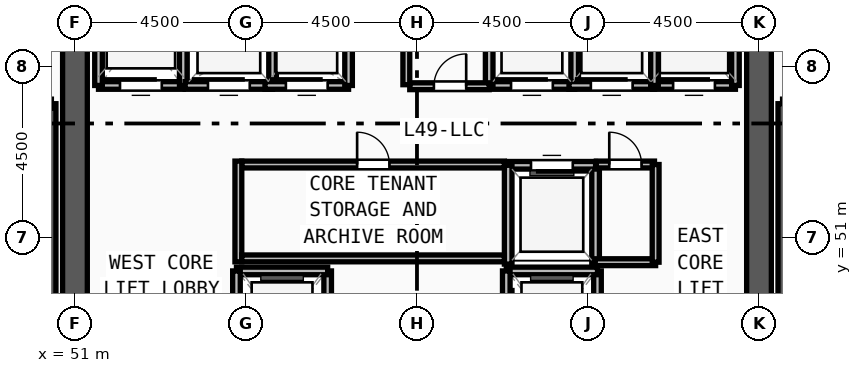
"""IFC4 building model, lengths in metres.
Left out: names, types, materials, properties, quantities, classifications, styles, units other than length and angle.
Written with IfcOpenShell. Run it as: python <this file> out.ifc"""

import sys

from ifc_helpers import new_model, si_unit, direction, frame, frame_2d, origin, place, context, subcontext, project, spatial, rectangle, extrude, source, transform, mapped, element, fill, save


model = new_model("IFC4")
c1 = context("Model", 3, precision=1e-05, world=origin(), true_north=direction((0.0, 1.0)))
c2 = subcontext(c1, "Body", "Model", "MODEL_VIEW")
j1 = project(units=[si_unit("LENGTHUNIT", "METRE"), si_unit("PLANEANGLEUNIT", "RADIAN")], contexts=[c1])
p1 = place(None, origin())
s1 = spatial("IfcSite", under=j1, at=p1, CompositionType="ELEMENT")
p2 = place(p1, origin())
s2 = spatial("IfcBuilding", under=s1, at=p2, CompositionType="ELEMENT")
p3 = place(p2, frame((0.0, 0.0, 189.75)))
s3 = spatial("IfcBuildingStorey", under=s2, at=p3, CompositionType="ELEMENT", Elevation=189.75)
p4 = place(p3, frame((69.0, 60.825, 0.0), z_axis=(0.0, 0.0, 1.0), x_axis=(0.0, -1.0, 0.0)))
e1 = element("IfcWall", 1, at=p4, inside=s3, PredefinedType="SHEAR", context=c2, shape_type="SweptSolid", body=[
    extrude(rectangle(XDim=13.65, YDim=0.65, at=frame_2d((6.825, 0.0))), origin(), (0.0, 0.0, 1.0), 4.32),
])
m1 = source(origin(), c2, "Body", "SweptSolid", [
    extrude(rectangle(XDim=1.2, YDim=2.2, at=frame_2d((0.6, 1.1))), frame((0.0, 0.335, 0.0), z_axis=(0.0, -1.0, 0.0), x_axis=(1.0, 0.0, 0.0)), (0.0, 0.0, 1.0), 0.67),
])
p5 = place(p4, frame((1.275, 0.0, 0.0)))
e2 = element("IfcOpeningElement", 2, at=p5, cuts=e1, PredefinedType="OPENING", context=c2, shape_type="MappedRepresentation", body=[
    mapped(m1, transform((0.0, 0.0, 0.0), x_axis=(1.0, 0.0, 0.0), y_axis=(0.0, 1.0, 0.0), z_axis=(0.0, 0.0, 1.0), scale=1.0)),
])
p6 = place(p3, frame((51.0, 47.175, 0.0), z_axis=(0.0, 0.0, 1.0), x_axis=(0.0, 1.0, 0.0)))
e3 = element("IfcWall", 3, at=p6, inside=s3, PredefinedType="SHEAR", context=c2, shape_type="SweptSolid", body=[
    extrude(rectangle(XDim=13.65, YDim=0.65, at=frame_2d((6.825, 0.0))), origin(), (0.0, 0.0, 1.0), 4.32),
])
m2 = source(origin(), c2, "Body", "SweptSolid", [
    extrude(rectangle(XDim=1.1, YDim=2.2, at=frame_2d((0.55, 1.1))), frame((0.0, 0.335, 0.0), z_axis=(0.0, -1.0, 0.0), x_axis=(1.0, 0.0, 0.0)), (0.0, 0.0, 1.0), 0.67),
])
p7 = place(p6, frame((11.725, 0.0, 0.0)))
e4 = element("IfcOpeningElement", 4, at=p7, cuts=e3, PredefinedType="OPENING", context=c2, shape_type="MappedRepresentation", body=[
    mapped(m2, transform((0.0, 0.0, 0.0), x_axis=(1.0, 0.0, 0.0), y_axis=(0.0, 1.0, 0.0), z_axis=(0.0, 0.0, 1.0), scale=1.0)),
])
for number, where, z_axis, x_axis in (
    (5, (50.38, 46.7, 0.0), (0.0, 0.0, 1.0), (0.0, 1.0, 0.0)),
    (6, (69.62, 54.52, 0.0), (0.0, 0.0, 1.0), (0.0, -1.0, 0.0)),
):
    element("IfcWall", number, at=place(p3, frame(where, z_axis=z_axis, x_axis=x_axis)), inside=s3, PredefinedType="SOLIDWALL", context=c2, shape_type="SweptSolid", body=[
        extrude(rectangle(XDim=7.82, YDim=0.24, at=frame_2d((3.91, 0.0))), origin(), (0.0, 0.0, 1.0), 4.32),
    ])
p8 = place(p3, frame((57.65, 47.12, 0.0), z_axis=(0.0, 0.0, 1.0), x_axis=(0.0, 1.0, 0.0)))
e7 = element("IfcWall", 7, at=p8, inside=s3, PredefinedType="SOLIDWALL", context=c2, shape_type="SweptSolid", body=[
    extrude(rectangle(XDim=3.0, YDim=0.2, at=frame_2d((1.5, 0.0))), origin(), (0.0, 0.0, 1.0), 4.32),
])
m3 = source(origin(), c2, "Body", "SweptSolid", [
    extrude(rectangle(XDim=1.2, YDim=2.3, at=frame_2d((0.6, 1.15))), frame((0.0, 0.11, 0.0), z_axis=(0.0, -1.0, 0.0), x_axis=(1.0, 0.0, 0.0)), (0.0, 0.0, 1.0), 0.22),
])
p9 = place(p8, frame((0.9, 0.0, 0.0)))
e8 = element("IfcOpeningElement", 8, at=p9, cuts=e7, PredefinedType="OPENING", context=c2, shape_type="MappedRepresentation", body=[
    mapped(m3, transform((0.0, 0.0, 0.0), x_axis=(1.0, 0.0, 0.0), y_axis=(0.0, 1.0, 0.0), z_axis=(0.0, 0.0, 1.0), scale=1.0)),
])
p10 = place(p3, frame((57.65, 50.12, 0.0), z_axis=(0.0, 0.0, 1.0), x_axis=(-1.0, 0.0, 0.0)))
e9 = element("IfcWall", 9, at=p10, inside=s3, PredefinedType="SOLIDWALL", context=c2, shape_type="SweptSolid", body=[
    extrude(rectangle(XDim=2.4, YDim=0.2, at=frame_2d((1.2, 0.0))), origin(), (0.0, 0.0, 1.0), 4.32),
])
for number, where, z_axis, x_axis in (
    (10, (55.25, 50.12, 0.0), (0.0, 0.0, 1.0), (0.0, -1.0, 0.0)),
    (11, (64.75, 47.12, 0.0), (0.0, 0.0, 1.0), (0.0, 1.0, 0.0)),
):
    element("IfcWall", number, at=place(p3, frame(where, z_axis=z_axis, x_axis=x_axis)), inside=s3, PredefinedType="SOLIDWALL", context=c2, shape_type="SweptSolid", body=[
        extrude(rectangle(XDim=3.0, YDim=0.2, at=frame_2d((1.5, 0.0))), origin(), (0.0, 0.0, 1.0), 4.32),
    ])
p11 = place(p3, frame((64.75, 50.12, 0.0), z_axis=(0.0, 0.0, 1.0), x_axis=(-1.0, 0.0, 0.0)))
e12 = element("IfcWall", 12, at=p11, inside=s3, PredefinedType="SOLIDWALL", context=c2, shape_type="SweptSolid", body=[
    extrude(rectangle(XDim=2.4, YDim=0.2, at=frame_2d((1.2, 0.0))), origin(), (0.0, 0.0, 1.0), 4.32),
])
p12 = place(p3, frame((62.35, 50.12, 0.0), z_axis=(0.0, 0.0, 1.0), x_axis=(0.0, -1.0, 0.0)))
e13 = element("IfcWall", 13, at=p12, inside=s3, PredefinedType="SOLIDWALL", context=c2, shape_type="SweptSolid", body=[
    extrude(rectangle(XDim=3.0, YDim=0.2, at=frame_2d((1.5, 0.0))), origin(), (0.0, 0.0, 1.0), 4.32),
])
p13 = place(p12, frame((0.9, 0.0, 0.0)))
e14 = element("IfcOpeningElement", 14, at=p13, cuts=e13, PredefinedType="OPENING", context=c2, shape_type="MappedRepresentation", body=[
    mapped(m3, transform((0.0, 0.0, 0.0), x_axis=(1.0, 0.0, 0.0), y_axis=(0.0, 1.0, 0.0), z_axis=(0.0, 0.0, 1.0), scale=1.0)),
])
p14 = place(p3, frame((51.62, 55.0, 0.0), z_axis=(0.0, 0.0, 1.0), x_axis=(1.0, 0.0, 0.0)))
e15 = element("IfcWall", 15, at=p14, inside=s3, PredefinedType="SOLIDWALL", context=c2, shape_type="SweptSolid", body=[
    extrude(rectangle(XDim=2.23, YDim=0.2, at=frame_2d((1.115, 0.0))), origin(), (0.0, 0.0, 1.0), 4.32),
])
m4 = source(origin(), c2, "Body", "SweptSolid", [
    extrude(rectangle(XDim=1.1, YDim=2.2, at=frame_2d((0.55, 1.1))), frame((0.0, 0.11, 0.0), z_axis=(0.0, -1.0, 0.0), x_axis=(1.0, 0.0, 0.0)), (0.0, 0.0, 1.0), 0.22),
])
p15 = place(p14, frame((0.565, 0.0, 0.0)))
e16 = element("IfcOpeningElement", 16, at=p15, cuts=e15, PredefinedType="OPENING", context=c2, shape_type="MappedRepresentation", body=[
    mapped(m4, transform((0.0, 0.0, 0.0), x_axis=(1.0, 0.0, 0.0), y_axis=(0.0, 1.0, 0.0), z_axis=(0.0, 0.0, 1.0), scale=1.0)),
])
for number, where, z_axis, x_axis in (
    (17, (53.85, 55.0, 0.0), (0.0, 0.0, 1.0), (0.0, 1.0, 0.0)),
    (18, (51.62, 58.0, 0.0), (0.0, 0.0, 1.0), (0.0, -1.0, 0.0)),
):
    element("IfcWall", number, at=place(p3, frame(where, z_axis=z_axis, x_axis=x_axis)), inside=s3, PredefinedType="SOLIDWALL", context=c2, shape_type="SweptSolid", body=[
        extrude(rectangle(XDim=3.0, YDim=0.2, at=frame_2d((1.5, 0.0))), origin(), (0.0, 0.0, 1.0), 4.32),
    ])
p16 = place(p3, frame((66.2, 55.0, 0.0), z_axis=(0.0, 0.0, 1.0), x_axis=(1.0, 0.0, 0.0)))
e19 = element("IfcWall", 19, at=p16, inside=s3, PredefinedType="SOLIDWALL", context=c2, shape_type="SweptSolid", body=[
    extrude(rectangle(XDim=2.18, YDim=0.2, at=frame_2d((1.09, 0.0))), origin(), (0.0, 0.0, 1.0), 4.32),
])
p17 = place(p16, frame((0.54, 0.0, 0.0)))
e20 = element("IfcOpeningElement", 20, at=p17, cuts=e19, PredefinedType="OPENING", context=c2, shape_type="MappedRepresentation", body=[
    mapped(m4, transform((0.0, 0.0, 0.0), x_axis=(1.0, 0.0, 0.0), y_axis=(0.0, 1.0, 0.0), z_axis=(0.0, 0.0, 1.0), scale=1.0)),
])
p18 = place(p3, frame((68.38, 55.0, 0.0), z_axis=(0.0, 0.0, 1.0), x_axis=(0.0, 1.0, 0.0)))
e21 = element("IfcWall", 21, at=p18, inside=s3, PredefinedType="SOLIDWALL", context=c2, shape_type="SweptSolid", body=[
    extrude(rectangle(XDim=2.75, YDim=0.2, at=frame_2d((1.375, 0.0))), origin(), (0.0, 0.0, 1.0), 4.32),
])
p19 = place(p3, frame((64.7, 50.3, 0.0), z_axis=(0.0, 0.0, 1.0), x_axis=(0.0, 1.0, 0.0)))
e22 = element("IfcWall", 22, at=p19, inside=s3, PredefinedType="SOLIDWALL", context=c2, shape_type="SweptSolid", body=[
    extrude(rectangle(XDim=2.6, YDim=0.2, at=frame_2d((1.3, 0.0))), origin(), (0.0, 0.0, 1.0), 4.32),
])
p20 = place(p3, frame((64.7, 52.9, 0.0), z_axis=(0.0, 0.0, 1.0), x_axis=(-1.0, 0.0, 0.0)))
e23 = element("IfcWall", 23, at=p20, inside=s3, PredefinedType="SOLIDWALL", context=c2, shape_type="SweptSolid", body=[
    extrude(rectangle(XDim=2.3, YDim=0.2, at=frame_2d((1.15, 0.0))), origin(), (0.0, 0.0, 1.0), 4.32),
])
p21 = place(p20, frame((0.6, 0.0, 0.0)))
e24 = element("IfcOpeningElement", 24, at=p21, cuts=e23, PredefinedType="OPENING", context=c2, shape_type="MappedRepresentation", body=[
    mapped(m4, transform((0.0, 0.0, 0.0), x_axis=(1.0, 0.0, 0.0), y_axis=(0.0, 1.0, 0.0), z_axis=(0.0, 0.0, 1.0), scale=1.0)),
])
p22 = place(p3, frame((62.4, 52.9, 0.0), z_axis=(0.0, 0.0, 1.0), x_axis=(0.0, -1.0, 0.0)))
e25 = element("IfcWall", 25, at=p22, inside=s3, PredefinedType="SOLIDWALL", context=c2, shape_type="SweptSolid", body=[
    extrude(rectangle(XDim=2.6, YDim=0.2, at=frame_2d((1.3, 0.0))), origin(), (0.0, 0.0, 1.0), 4.32),
])
p23 = place(p3, frame((53.9, 55.0, 0.0), z_axis=(0.0, 0.0, 1.0), x_axis=(1.0, 0.0, 0.0)))
e26 = element("IfcWall", 26, at=p23, inside=s3, PredefinedType="SOLIDWALL", context=c2, shape_type="SweptSolid", body=[
    extrude(rectangle(XDim=2.3, YDim=0.2, at=frame_2d((1.15, 0.0))), origin(), (0.0, 0.0, 1.0), 4.32),
])
p24 = place(p23, frame((0.6, 0.0, 0.0)))
e27 = element("IfcOpeningElement", 27, at=p24, cuts=e26, PredefinedType="OPENING", context=c2, shape_type="MappedRepresentation", body=[
    mapped(m4, transform((0.0, 0.0, 0.0), x_axis=(1.0, 0.0, 0.0), y_axis=(0.0, 1.0, 0.0), z_axis=(0.0, 0.0, 1.0), scale=1.0)),
])
p25 = place(p3, frame((56.2, 55.0, 0.0), z_axis=(0.0, 0.0, 1.0), x_axis=(0.0, 1.0, 0.0)))
e28 = element("IfcWall", 28, at=p25, inside=s3, PredefinedType="SOLIDWALL", context=c2, shape_type="SweptSolid", body=[
    extrude(rectangle(XDim=2.6, YDim=0.2, at=frame_2d((1.3, 0.0))), origin(), (0.0, 0.0, 1.0), 4.32),
])
p26 = place(p3, frame((56.0, 55.0, 0.0), z_axis=(0.0, 0.0, 1.0), x_axis=(1.0, 0.0, 0.0)))
e29 = element("IfcWall", 29, at=p26, inside=s3, PredefinedType="SOLIDWALL", context=c2, shape_type="SweptSolid", body=[
    extrude(rectangle(XDim=2.2, YDim=0.2, at=frame_2d((1.1, 0.0))), origin(), (0.0, 0.0, 1.0), 4.32),
])
p27 = place(p26, frame((0.55, 0.0, 0.0)))
e30 = element("IfcOpeningElement", 30, at=p27, cuts=e29, PredefinedType="OPENING", context=c2, shape_type="MappedRepresentation", body=[
    mapped(m4, transform((0.0, 0.0, 0.0), x_axis=(1.0, 0.0, 0.0), y_axis=(0.0, 1.0, 0.0), z_axis=(0.0, 0.0, 1.0), scale=1.0)),
])
p28 = place(p3, frame((58.2, 55.0, 0.0), z_axis=(0.0, 0.0, 1.0), x_axis=(0.0, 1.0, 0.0)))
e31 = element("IfcWall", 31, at=p28, inside=s3, PredefinedType="SOLIDWALL", context=c2, shape_type="SweptSolid", body=[
    extrude(rectangle(XDim=2.6, YDim=0.2, at=frame_2d((1.3, 0.0))), origin(), (0.0, 0.0, 1.0), 4.32),
])
p29 = place(p3, frame((61.9, 55.0, 0.0), z_axis=(0.0, 0.0, 1.0), x_axis=(1.0, 0.0, 0.0)))
e32 = element("IfcWall", 32, at=p29, inside=s3, PredefinedType="SOLIDWALL", context=c2, shape_type="SweptSolid", body=[
    extrude(rectangle(XDim=2.25, YDim=0.2, at=frame_2d((1.125, 0.0))), origin(), (0.0, 0.0, 1.0), 4.32),
])
p30 = place(p29, frame((0.575, 0.0, 0.0)))
e33 = element("IfcOpeningElement", 33, at=p30, cuts=e32, PredefinedType="OPENING", context=c2, shape_type="MappedRepresentation", body=[
    mapped(m4, transform((0.0, 0.0, 0.0), x_axis=(1.0, 0.0, 0.0), y_axis=(0.0, 1.0, 0.0), z_axis=(0.0, 0.0, 1.0), scale=1.0)),
])
for number, where, z_axis, x_axis in (
    (34, (64.15, 55.0, 0.0), (0.0, 0.0, 1.0), (0.0, 1.0, 0.0)),
    (35, (61.9, 57.6, 0.0), (0.0, 0.0, 1.0), (0.0, -1.0, 0.0)),
):
    element("IfcWall", number, at=place(p3, frame(where, z_axis=z_axis, x_axis=x_axis)), inside=s3, PredefinedType="SOLIDWALL", context=c2, shape_type="SweptSolid", body=[
        extrude(rectangle(XDim=2.6, YDim=0.2, at=frame_2d((1.3, 0.0))), origin(), (0.0, 0.0, 1.0), 4.32),
    ])
p31 = place(p3, frame((64.0, 55.0, 0.0), z_axis=(0.0, 0.0, 1.0), x_axis=(1.0, 0.0, 0.0)))
e36 = element("IfcWall", 36, at=p31, inside=s3, PredefinedType="SOLIDWALL", context=c2, shape_type="SweptSolid", body=[
    extrude(rectangle(XDim=2.25, YDim=0.2, at=frame_2d((1.125, 0.0))), origin(), (0.0, 0.0, 1.0), 4.32),
])
p32 = place(p31, frame((0.575, 0.0, 0.0)))
e37 = element("IfcOpeningElement", 37, at=p32, cuts=e36, PredefinedType="OPENING", context=c2, shape_type="MappedRepresentation", body=[
    mapped(m4, transform((0.0, 0.0, 0.0), x_axis=(1.0, 0.0, 0.0), y_axis=(0.0, 1.0, 0.0), z_axis=(0.0, 0.0, 1.0), scale=1.0)),
])
p33 = place(p3, frame((66.25, 55.0, 0.0), z_axis=(0.0, 0.0, 1.0), x_axis=(0.0, 1.0, 0.0)))
e38 = element("IfcWall", 38, at=p33, inside=s3, PredefinedType="SOLIDWALL", context=c2, shape_type="SweptSolid", body=[
    extrude(rectangle(XDim=2.6, YDim=0.2, at=frame_2d((1.3, 0.0))), origin(), (0.0, 0.0, 1.0), 4.32),
])
p34 = place(p3, frame((55.39, 52.92, 0.0), z_axis=(0.0, 0.0, 1.0), x_axis=(1.0, 0.0, 0.0)))
e39 = element("IfcWall", 39, at=p34, inside=s3, PredefinedType="PARTITIONING", context=c2, shape_type="SweptSolid", body=[
    extrude(rectangle(XDim=6.91, YDim=0.18, at=frame_2d((3.455, 0.0))), origin(), (0.0, 0.0, 1.0), 4.32),
])
m5 = source(origin(), c2, "Body", "SweptSolid", [
    extrude(rectangle(XDim=0.85, YDim=2.1, at=frame_2d((0.425, 1.05))), frame((0.0, 0.1, 0.0), z_axis=(0.0, -1.0, 0.0), x_axis=(1.0, 0.0, 0.0)), (0.0, 0.0, 1.0), 0.2),
])
p35 = place(p34, frame((3.035, 0.0, 0.0)))
e40 = element("IfcOpeningElement", 40, at=p35, cuts=e39, PredefinedType="OPENING", context=c2, shape_type="MappedRepresentation", body=[
    mapped(m5, transform((0.0, 0.0, 0.0), x_axis=(1.0, 0.0, 0.0), y_axis=(0.0, 1.0, 0.0), z_axis=(0.0, 0.0, 1.0), scale=1.0)),
])
p36 = place(p3, frame((59.81, 54.98, 0.0), z_axis=(0.0, 0.0, 1.0), x_axis=(1.0, 0.0, 0.0)))
e41 = element("IfcWall", 41, at=p36, inside=s3, PredefinedType="PARTITIONING", context=c2, shape_type="SweptSolid", body=[
    extrude(rectangle(XDim=2.09, YDim=0.18, at=frame_2d((1.045, 0.0))), origin(), (0.0, 0.0, 1.0), 4.32),
])
p37 = place(p36, frame((0.635, 0.0, 0.0)))
e42 = element("IfcOpeningElement", 42, at=p37, cuts=e41, PredefinedType="OPENING", context=c2, shape_type="MappedRepresentation", body=[
    mapped(m5, transform((0.0, 0.0, 0.0), x_axis=(1.0, 0.0, 0.0), y_axis=(0.0, 1.0, 0.0), z_axis=(0.0, 0.0, 1.0), scale=1.0)),
])
p38 = place(p3, frame((64.72, 52.92, 0.0), z_axis=(0.0, 0.0, 1.0), x_axis=(1.0, 0.0, 0.0)))
e43 = element("IfcWall", 43, at=p38, inside=s3, PredefinedType="PARTITIONING", context=c2, shape_type="SweptSolid", body=[
    extrude(rectangle(XDim=1.53, YDim=0.18, at=frame_2d((0.765, 0.0))), origin(), (0.0, 0.0, 1.0), 4.32),
])
p39 = place(p38, frame((0.34, 0.0, 0.0)))
e44 = element("IfcOpeningElement", 44, at=p39, cuts=e43, PredefinedType="OPENING", context=c2, shape_type="MappedRepresentation", body=[
    mapped(m5, transform((0.0, 0.0, 0.0), x_axis=(1.0, 0.0, 0.0), y_axis=(0.0, 1.0, 0.0), z_axis=(0.0, 0.0, 1.0), scale=1.0)),
])
p40 = place(p3, frame((59.72, 55.02, 0.0), z_axis=(0.0, 0.0, 1.0), x_axis=(0.0, 1.0, 0.0)))
e45 = element("IfcWall", 45, at=p40, inside=s3, PredefinedType="PARTITIONING", context=c2, shape_type="SweptSolid", body=[
    extrude(rectangle(XDim=1.73, YDim=0.18, at=frame_2d((0.865, 0.0))), origin(), (0.0, 0.0, 1.0), 4.32),
])
p41 = place(p3, frame((64.69, 50.35, 0.0), z_axis=(0.0, 0.0, 1.0), x_axis=(1.0, 0.0, 0.0)))
e46 = element("IfcWall", 46, at=p41, inside=s3, PredefinedType="PARTITIONING", context=c2, shape_type="SweptSolid", body=[
    extrude(rectangle(XDim=1.59, YDim=0.18, at=frame_2d((0.795, 0.0))), origin(), (0.0, 0.0, 1.0), 4.32),
])
p42 = place(p3, frame((66.28, 50.35, 0.0), z_axis=(0.0, 0.0, 1.0), x_axis=(0.0, 1.0, 0.0)))
e47 = element("IfcWall", 47, at=p42, inside=s3, PredefinedType="PARTITIONING", context=c2, shape_type="SweptSolid", body=[
    extrude(rectangle(XDim=2.57, YDim=0.18, at=frame_2d((1.285, 0.0))), origin(), (0.0, 0.0, 1.0), 4.32),
])
p43 = place(p3, frame((55.3, 50.36, 0.0), z_axis=(0.0, 0.0, 1.0), x_axis=(0.0, 1.0, 0.0)))
e48 = element("IfcWall", 48, at=p43, inside=s3, PredefinedType="PARTITIONING", context=c2, shape_type="SweptSolid", body=[
    extrude(rectangle(XDim=2.65, YDim=0.18, at=frame_2d((1.325, 0.0))), origin(), (0.0, 0.0, 1.0), 4.32),
])
p44 = place(p3, frame((55.39, 50.45, 0.0), z_axis=(0.0, 0.0, 1.0), x_axis=(1.0, 0.0, 0.0)))
e49 = element("IfcWall", 49, at=p44, inside=s3, PredefinedType="PARTITIONING", context=c2, shape_type="SweptSolid", body=[
    extrude(rectangle(XDim=6.91, YDim=0.18, at=frame_2d((3.455, 0.0))), origin(), (0.0, 0.0, 1.0), 4.32),
])
m6 = source(origin(), c2, "Body", "SweptSolid", [
    extrude(rectangle(XDim=1.1, YDim=2.2, at=frame_2d((0.55, 1.1))), frame((0.0, 0.025, 0.0), z_axis=(0.0, -1.0, 0.0), x_axis=(1.0, 0.0, 0.0)), (0.0, 0.0, 1.0), 0.05),
])
p45 = place(p15, origin())
e50 = element("IfcDoor", 50, at=p45, inside=s3, OperationType="SLIDING_TO_LEFT", PredefinedType="DOOR", context=c2, shape_type="MappedRepresentation", body=[
    mapped(m6, transform((0.0, 0.0, 0.0), x_axis=(1.0, 0.0, 0.0), y_axis=(0.0, 1.0, 0.0), z_axis=(0.0, 0.0, 1.0), scale=1.0)),
])
fill(e16, e50)
p46 = place(p17, origin())
e51 = element("IfcDoor", 51, at=p46, inside=s3, OperationType="SLIDING_TO_LEFT", PredefinedType="DOOR", context=c2, shape_type="MappedRepresentation", body=[
    mapped(m6, transform((0.0, 0.0, 0.0), x_axis=(1.0, 0.0, 0.0), y_axis=(0.0, 1.0, 0.0), z_axis=(0.0, 0.0, 1.0), scale=1.0)),
])
fill(e20, e51)
p47 = place(p21, origin())
e52 = element("IfcDoor", 52, at=p47, inside=s3, OperationType="SLIDING_TO_LEFT", PredefinedType="DOOR", context=c2, shape_type="MappedRepresentation", body=[
    mapped(m6, transform((0.0, 0.0, 0.0), x_axis=(1.0, 0.0, 0.0), y_axis=(0.0, 1.0, 0.0), z_axis=(0.0, 0.0, 1.0), scale=1.0)),
])
fill(e24, e52)
p48 = place(p24, origin())
e53 = element("IfcDoor", 53, at=p48, inside=s3, OperationType="SLIDING_TO_LEFT", PredefinedType="DOOR", context=c2, shape_type="MappedRepresentation", body=[
    mapped(m6, transform((0.0, 0.0, 0.0), x_axis=(1.0, 0.0, 0.0), y_axis=(0.0, 1.0, 0.0), z_axis=(0.0, 0.0, 1.0), scale=1.0)),
])
fill(e27, e53)
p49 = place(p27, origin())
e54 = element("IfcDoor", 54, at=p49, inside=s3, OperationType="SLIDING_TO_LEFT", PredefinedType="DOOR", context=c2, shape_type="MappedRepresentation", body=[
    mapped(m6, transform((0.0, 0.0, 0.0), x_axis=(1.0, 0.0, 0.0), y_axis=(0.0, 1.0, 0.0), z_axis=(0.0, 0.0, 1.0), scale=1.0)),
])
fill(e30, e54)
p50 = place(p30, origin())
e55 = element("IfcDoor", 55, at=p50, inside=s3, OperationType="SLIDING_TO_LEFT", PredefinedType="DOOR", context=c2, shape_type="MappedRepresentation", body=[
    mapped(m6, transform((0.0, 0.0, 0.0), x_axis=(1.0, 0.0, 0.0), y_axis=(0.0, 1.0, 0.0), z_axis=(0.0, 0.0, 1.0), scale=1.0)),
])
fill(e33, e55)
p51 = place(p32, origin())
e56 = element("IfcDoor", 56, at=p51, inside=s3, OperationType="SLIDING_TO_LEFT", PredefinedType="DOOR", context=c2, shape_type="MappedRepresentation", body=[
    mapped(m6, transform((0.0, 0.0, 0.0), x_axis=(1.0, 0.0, 0.0), y_axis=(0.0, 1.0, 0.0), z_axis=(0.0, 0.0, 1.0), scale=1.0)),
])
fill(e37, e56)
m7 = source(origin(), c2, "Body", "SweptSolid", [
    extrude(rectangle(XDim=0.85, YDim=2.1, at=frame_2d((0.425, 1.05))), frame((0.0, 0.025, 0.0), z_axis=(0.0, -1.0, 0.0), x_axis=(1.0, 0.0, 0.0)), (0.0, 0.0, 1.0), 0.05),
])
p52 = place(p35, origin())
e57 = element("IfcDoor", 57, at=p52, inside=s3, OperationType="SINGLE_SWING_LEFT", PredefinedType="DOOR", context=c2, shape_type="MappedRepresentation", body=[
    mapped(m7, transform((0.0, 0.0, 0.0), x_axis=(1.0, 0.0, 0.0), y_axis=(0.0, 1.0, 0.0), z_axis=(0.0, 0.0, 1.0), scale=1.0)),
])
fill(e40, e57)
p53 = place(p37, origin())
e58 = element("IfcDoor", 58, at=p53, inside=s3, OperationType="SINGLE_SWING_RIGHT", PredefinedType="DOOR", context=c2, shape_type="MappedRepresentation", body=[
    mapped(m7, transform((0.0, 0.0, 0.0), x_axis=(1.0, 0.0, 0.0), y_axis=(0.0, 1.0, 0.0), z_axis=(0.0, 0.0, 1.0), scale=1.0)),
])
fill(e42, e58)
p54 = place(p39, origin())
e59 = element("IfcDoor", 59, at=p54, inside=s3, OperationType="SINGLE_SWING_LEFT", PredefinedType="DOOR", context=c2, shape_type="MappedRepresentation", body=[
    mapped(m7, transform((0.0, 0.0, 0.0), x_axis=(1.0, 0.0, 0.0), y_axis=(0.0, 1.0, 0.0), z_axis=(0.0, 0.0, 1.0), scale=1.0)),
])
fill(e44, e59)
save(model, sys.argv[1])
